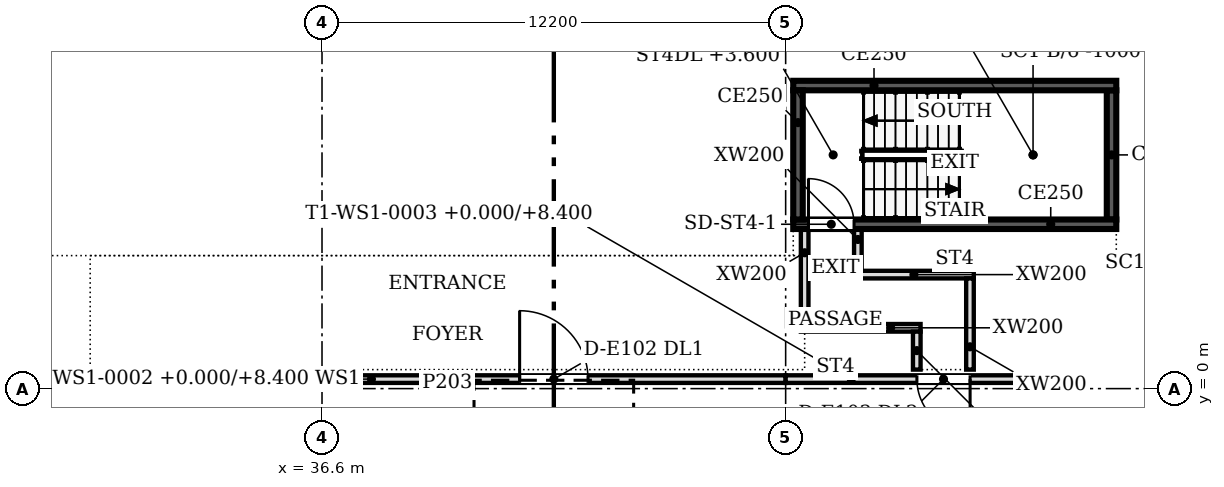
"""IFC4 building model, lengths in metres.
Left out: names, types, materials, properties, quantities, classifications, styles, units other than length and angle.
Written with IfcOpenShell. Run it as: python <this file> out.ifc"""

import sys

from ifc_helpers import new_model, si_unit, direction, frame, frame_2d, origin, place, context, subcontext, project, spatial, polyline, rectangle, outline, extrude, faceted_brep, source, transform, mapped, element, fill, save


model = new_model("IFC4")
c1 = context("Model", 3, precision=1e-05, world=origin(), true_north=direction((0.0, 1.0)))
c2 = subcontext(c1, "Body", "Model", "MODEL_VIEW")
j1 = project(units=[si_unit("LENGTHUNIT", "METRE"), si_unit("PLANEANGLEUNIT", "RADIAN")], contexts=[c1])
p1 = place(None, origin())
s1 = spatial("IfcSite", under=j1, at=p1, CompositionType="ELEMENT")
p2 = place(p1, origin())
s2 = spatial("IfcBuilding", under=s1, at=p2, CompositionType="ELEMENT")
p3 = place(p2, origin())
s3 = spatial("IfcBuildingStorey", under=s2, at=p3, CompositionType="ELEMENT", Elevation=0.0)
m1 = source(origin(), c2, "Body", "Brep", [
    faceted_brep([(0.0, -0.1, 0.0), (6.072, -0.1, 0.0), (0.019, -0.1, 8.4), (0.0, -0.1, 8.373), (0.037, 0.1, 8.374), (6.072, 0.1, 0.0), (0.037, 0.1, 0.0), (0.019, 0.0, 8.4)], [[[0, 1, 2, 3]], [[4, 5, 6]], [[6, 5, 1, 0]], [[5, 4, 7, 2, 1]], [[3, 2, 7]], [[6, 0, 3, 7, 4]]]),
])
p4 = place(p3, frame((30.528, 0.25, 0.0), z_axis=(0.0, 0.0, 1.0), x_axis=(1.0, 0.0, 0.0)))
e1 = element("IfcWall", 1, at=p4, inside=s3, PredefinedType="PARTITIONING", context=c2, shape_type="MappedRepresentation", body=[
    mapped(m1, transform((0.0, 0.0, 0.0), scale=1.0)),
])
m2 = source(origin(), c2, "Body", "SweptSolid", [
    extrude(outline(polyline([(0.219, 0.15), (5.779, 0.15), (0.219, 7.866), (0.219, 0.15)])), frame((0.0, 0.11, 0.0), z_axis=(0.0, -1.0, 0.0), x_axis=(1.0, 0.0, 0.0)), (0.0, 0.0, 1.0), 0.22),
])
p5 = place(p4, origin())
e2 = element("IfcOpeningElement", 2, at=p5, cuts=e1, PredefinedType="OPENING", context=c2, shape_type="MappedRepresentation", body=[
    mapped(m2, transform((0.0, 0.0, 0.0), scale=1.0)),
])
m3 = source(origin(), c2, "Body", "SweptSolid", [
    extrude(outline(polyline([(0.0, 0.0), (12.2, 0.0), (6.1, 8.4), (0.0, 0.0)])), frame((0.0, 0.1, 0.0), z_axis=(0.0, -1.0, 0.0), x_axis=(1.0, 0.0, 0.0)), (0.0, 0.0, 1.0), 0.2),
])
p6 = place(p3, frame((36.6, 0.25, 0.0), z_axis=(0.0, 0.0, 1.0), x_axis=(1.0, 0.0, 0.0)))
e3 = element("IfcWall", 3, at=p6, inside=s3, PredefinedType="PARTITIONING", context=c2, shape_type="MappedRepresentation", body=[
    mapped(m3, transform((0.0, 0.0, 0.0), scale=1.0)),
])
m4 = source(origin(), c2, "Body", "SweptSolid", [
    extrude(rectangle(XDim=1.8, YDim=3.0, at=frame_2d((0.9, 1.5))), frame((0.0, 0.11, 0.0), z_axis=(0.0, -1.0, 0.0), x_axis=(1.0, 0.0, 0.0)), (0.0, 0.0, 1.0), 0.22),
])
p7 = place(p6, frame((5.2, 0.0, 0.0)))
e4 = element("IfcOpeningElement", 4, at=p7, cuts=e3, PredefinedType="OPENING", context=c2, shape_type="MappedRepresentation", body=[
    mapped(m4, transform((0.0, 0.0, 0.0), scale=1.0)),
])
m5 = source(origin(), c2, "Body", "SweptSolid", [
    extrude(outline(polyline([(9.749, 3.12), (6.1, 8.145), (2.451, 3.12), (9.749, 3.12)])), frame((0.0, 0.11, 0.0), z_axis=(0.0, -1.0, 0.0), x_axis=(1.0, 0.0, 0.0)), (0.0, 0.0, 1.0), 0.22),
])
p8 = place(p6, origin())
e5 = element("IfcOpeningElement", 5, at=p8, cuts=e3, PredefinedType="OPENING", context=c2, shape_type="MappedRepresentation", body=[
    mapped(m5, transform((0.0, 0.0, 0.0), scale=1.0)),
])
m6 = source(origin(), c2, "Body", "SweptSolid", [
    extrude(outline(polyline([(0.294, 0.15), (5.08, 0.15), (5.08, 3.0), (2.364, 3.0), (0.294, 0.15)])), frame((0.0, 0.11, 0.0), z_axis=(0.0, -1.0, 0.0), x_axis=(1.0, 0.0, 0.0)), (0.0, 0.0, 1.0), 0.22),
])
p9 = place(p6, origin())
e6 = element("IfcOpeningElement", 6, at=p9, cuts=e3, PredefinedType="OPENING", context=c2, shape_type="MappedRepresentation", body=[
    mapped(m6, transform((0.0, 0.0, 0.0), scale=1.0)),
])
m7 = source(origin(), c2, "Body", "SweptSolid", [
    extrude(outline(polyline([(7.12, 0.15), (11.906, 0.15), (9.836, 3.0), (7.12, 3.0), (7.12, 0.15)])), frame((0.0, 0.11, 0.0), z_axis=(0.0, -1.0, 0.0), x_axis=(1.0, 0.0, 0.0)), (0.0, 0.0, 1.0), 0.22),
])
p10 = place(p6, origin())
e7 = element("IfcOpeningElement", 7, at=p10, cuts=e3, PredefinedType="OPENING", context=c2, shape_type="MappedRepresentation", body=[
    mapped(m7, transform((0.0, 0.0, 0.0), scale=1.0)),
])
m8 = source(origin(), c2, "Body", "Brep", [
    faceted_brep([(0.0, -0.1, 0.0), (6.072, -0.1, 0.0), (6.072, -0.1, 8.373), (6.053, -0.1, 8.4), (6.035, 0.1, 0.0), (0.0, 0.1, 0.0), (6.035, 0.1, 8.374), (6.053, 0.0, 8.4)], [[[0, 1, 2, 3]], [[4, 5, 6]], [[5, 4, 1, 0]], [[7, 3, 2]], [[6, 5, 0, 3, 7]], [[1, 4, 6, 7, 2]]]),
])
p11 = place(p3, frame((48.8, 0.25, 0.0), z_axis=(0.0, 0.0, 1.0), x_axis=(1.0, 0.0, 0.0)))
e8 = element("IfcWall", 8, at=p11, inside=s3, PredefinedType="PARTITIONING", context=c2, shape_type="MappedRepresentation", body=[
    mapped(m8, transform((0.0, 0.0, 0.0), scale=1.0)),
])
m9 = source(origin(), c2, "Body", "SweptSolid", [
    extrude(rectangle(XDim=1.4, YDim=2.4, at=frame_2d((0.7, 1.2))), frame((0.0, 0.11, 0.0), z_axis=(0.0, -1.0, 0.0), x_axis=(1.0, 0.0, 0.0)), (0.0, 0.0, 1.0), 0.22),
])
p12 = place(p11, frame((3.453, 0.0, 0.0)))
e9 = element("IfcOpeningElement", 9, at=p12, cuts=e8, PredefinedType="OPENING", context=c2, shape_type="MappedRepresentation", body=[
    mapped(m9, transform((0.0, 0.0, 0.0), scale=1.0)),
])
m10 = source(origin(), c2, "Body", "SweptSolid", [
    extrude(outline(polyline([(5.854, 7.866), (2.001, 2.52), (5.854, 2.52), (5.854, 7.866)])), frame((0.0, 0.11, 0.0), z_axis=(0.0, -1.0, 0.0), x_axis=(1.0, 0.0, 0.0)), (0.0, 0.0, 1.0), 0.22),
])
p13 = place(p11, origin())
e10 = element("IfcOpeningElement", 10, at=p13, cuts=e8, PredefinedType="OPENING", context=c2, shape_type="MappedRepresentation", body=[
    mapped(m10, transform((0.0, 0.0, 0.0), scale=1.0)),
])
m11 = source(origin(), c2, "Body", "SweptSolid", [
    extrude(outline(polyline([(0.293, 0.15), (3.333, 0.15), (3.333, 2.4), (1.915, 2.4), (0.293, 0.15)])), frame((0.0, 0.11, 0.0), z_axis=(0.0, -1.0, 0.0), x_axis=(1.0, 0.0, 0.0)), (0.0, 0.0, 1.0), 0.22),
])
p14 = place(p11, origin())
e11 = element("IfcOpeningElement", 11, at=p14, cuts=e8, PredefinedType="OPENING", context=c2, shape_type="MappedRepresentation", body=[
    mapped(m11, transform((0.0, 0.0, 0.0), scale=1.0)),
])
m12 = source(origin(), c2, "Body", "SweptSolid", [
    extrude(outline(polyline([(4.973, 0.15), (5.854, 0.15), (5.854, 2.4), (4.973, 2.4), (4.973, 0.15)])), frame((0.0, 0.11, 0.0), z_axis=(0.0, -1.0, 0.0), x_axis=(1.0, 0.0, 0.0)), (0.0, 0.0, 1.0), 0.22),
])
p15 = place(p11, origin())
e12 = element("IfcOpeningElement", 12, at=p15, cuts=e8, PredefinedType="OPENING", context=c2, shape_type="MappedRepresentation", body=[
    mapped(m12, transform((0.0, 0.0, 0.0), scale=1.0)),
])
m13 = source(origin(), c2, "Body", "Brep", [
    faceted_brep([(0.0, -0.25, 0.0), (6.1, -0.25, 8.4), (6.1, -0.25, 8.4), (5.482, -0.25, 8.4), (0.0, -0.25, 0.851), (0.0, 0.25, 0.851), (5.482, 0.25, 8.4), (6.1, 0.25, 8.4), (6.1, 0.25, 8.4), (0.0, 0.25, 0.0)], [[[0, 1, 2, 3, 4]], [[5, 6, 7, 8, 9]], [[9, 8, 1, 0]], [[7, 6, 3, 2]], [[6, 5, 4, 3]], [[5, 9, 0, 4]], [[1, 8, 7, 2]]]),
])
p16 = place(p3, frame((36.6, 0.25, 0.0), z_axis=(0.0, 0.0, 1.0), x_axis=(1.0, 0.0, 0.0)))
e13 = element("IfcWall", 13, at=p16, inside=s3, PredefinedType="SOLIDWALL", context=c2, shape_type="MappedRepresentation", body=[
    mapped(m13, transform((0.0, 0.0, 0.0), scale=1.0)),
])
m14 = source(origin(), c2, "Body", "Brep", [
    faceted_brep([(0.0, -0.25, 8.4), (6.053, -0.25, 0.0), (6.053, -0.25, 0.851), (0.613, -0.25, 8.4), (0.613, 0.25, 8.4), (6.053, 0.25, 0.851), (6.053, 0.25, 0.0), (0.047, 0.25, 8.335), (0.047, 0.25, 8.4), (0.0, 0.0, 8.4)], [[[0, 1, 2, 3]], [[4, 5, 6, 7, 8]], [[7, 6, 1, 0, 9]], [[5, 4, 3, 2]], [[4, 8, 9, 0, 3]], [[7, 9, 8]], [[1, 6, 5, 2]]]),
])
p17 = place(p3, frame((30.547, 0.25, 0.0), z_axis=(0.0, 0.0, 1.0), x_axis=(1.0, 0.0, 0.0)))
e14 = element("IfcWall", 14, at=p17, inside=s3, PredefinedType="SOLIDWALL", context=c2, shape_type="MappedRepresentation", body=[
    mapped(m14, transform((0.0, 0.0, 0.0), scale=1.0)),
])
m15 = source(origin(), c2, "Body", "Brep", [
    faceted_brep([(0.0, -0.25, 0.0), (6.053, -0.25, 8.4), (5.44, -0.25, 8.4), (0.0, -0.25, 0.851), (0.0, 0.25, 0.851), (5.44, 0.25, 8.4), (6.007, 0.25, 8.4), (6.007, 0.25, 8.335), (0.0, 0.25, 0.0), (6.053, 0.0, 8.4)], [[[0, 1, 2, 3]], [[4, 5, 6, 7, 8]], [[8, 7, 9, 1, 0]], [[6, 5, 2, 1, 9]], [[5, 4, 3, 2]], [[4, 8, 0, 3]], [[7, 6, 9]]]),
])
p18 = place(p3, frame((48.8, 0.25, 0.0), z_axis=(0.0, 0.0, 1.0), x_axis=(1.0, 0.0, 0.0)))
e15 = element("IfcWall", 15, at=p18, inside=s3, PredefinedType="SOLIDWALL", context=c2, shape_type="MappedRepresentation", body=[
    mapped(m15, transform((0.0, 0.0, 0.0), scale=1.0)),
])
m16 = source(origin(), c2, "Body", "SweptSolid", [
    extrude(outline(polyline([(0.0, 8.4), (6.1, 0.0), (6.1, 0.851), (0.618, 8.4), (0.0, 8.4)])), frame((0.0, 0.25, 0.0), z_axis=(0.0, -1.0, 0.0), x_axis=(1.0, 0.0, 0.0)), (0.0, 0.0, 1.0), 0.5),
])
p19 = place(p3, frame((42.7, 0.25, 0.0), z_axis=(0.0, 0.0, 1.0), x_axis=(1.0, 0.0, 0.0)))
e16 = element("IfcWall", 16, at=p19, inside=s3, PredefinedType="SOLIDWALL", context=c2, shape_type="MappedRepresentation", body=[
    mapped(m16, transform((0.0, 0.0, 0.0), scale=1.0)),
])
p20 = place(p2, frame((0.0, 0.0, 7.2)))
s4 = spatial("IfcBuildingStorey", under=s2, at=p20, CompositionType="ELEMENT", Elevation=7.2)
m17 = source(origin(), c2, "Body", "Brep", [
    faceted_brep([(0.0, -0.25, 0.0), (2.958, -0.25, 0.0), (2.958, -0.25, 16.8), (0.0, -0.25, 16.8), (0.047, 0.25, 16.8), (2.958, 0.25, 16.8), (2.958, 0.25, 0.0), (0.047, 0.25, 0.0), (0.0, 0.0, 0.0), (0.0, 0.0, 16.8)], [[[0, 1, 2, 3]], [[4, 5, 6, 7]], [[7, 6, 1, 0, 8]], [[5, 4, 9, 3, 2]], [[8, 0, 3, 9]], [[7, 8, 9, 4]], [[1, 6, 5, 2]]]),
])
p21 = place(p20, frame((54.854, 0.25, -7.2), z_axis=(0.0, 0.0, 1.0), x_axis=(0.932987802691, 0.359907988283, 0.0)))
e17 = element("IfcWall", 17, at=p21, inside=s4, PredefinedType="SOLIDWALL", context=c2, shape_type="MappedRepresentation", body=[
    mapped(m17, transform((0.0, 0.0, 0.0), scale=1.0)),
])
m18 = source(origin(), c2, "Body", "Brep", [
    faceted_brep([(0.0, -0.25, 0.0), (2.944, -0.25, 0.0), (2.944, -0.25, 16.8), (0.0, -0.25, 16.8), (0.053, 0.25, 16.8), (2.891, 0.25, 16.8), (2.891, 0.25, 0.0), (0.053, 0.25, 0.0), (2.944, 0.0, 0.0), (0.0, 0.0, 0.0), (2.944, 0.0, 16.8), (0.0, 0.0, 16.8)], [[[0, 1, 2, 3]], [[4, 5, 6, 7]], [[7, 6, 8, 1, 0, 9]], [[10, 2, 1, 8]], [[5, 4, 11, 3, 2, 10]], [[9, 0, 3, 11]], [[7, 9, 11, 4]], [[8, 6, 5, 10]]]),
])
p22 = place(p20, frame((57.606, 1.312, -7.2), z_axis=(0.0, 0.0, 1.0), x_axis=(0.707106781187, 0.707106781187, 0.0)))
e18 = element("IfcWall", 18, at=p22, inside=s4, PredefinedType="SOLIDWALL", context=c2, shape_type="MappedRepresentation", body=[
    mapped(m18, transform((0.0, 0.0, 0.0), scale=1.0)),
])
m19 = source(origin(), c2, "Body", "Brep", [
    faceted_brep([(0.0, -0.25, 0.0), (2.95, -0.25, 0.0), (2.95, -0.25, 16.8), (0.0, -0.25, 16.8), (0.053, 0.25, 16.8), (2.904, 0.25, 16.8), (2.904, 0.25, 0.0), (0.053, 0.25, 0.0), (2.95, 0.0, 0.0), (0.0, 0.0, 0.0), (2.95, 0.0, 16.8), (0.0, 0.0, 16.8)], [[[0, 1, 2, 3]], [[4, 5, 6, 7]], [[7, 6, 8, 1, 0, 9]], [[10, 2, 1, 8]], [[5, 4, 11, 3, 2, 10]], [[9, 0, 3, 11]], [[7, 9, 11, 4]], [[8, 6, 5, 10]]]),
])
p23 = place(p20, frame((27.794, 1.312, -7.2), z_axis=(0.0, 0.0, 1.0), x_axis=(0.932971887438, -0.359949242603, 0.0)))
e19 = element("IfcWall", 19, at=p23, inside=s4, PredefinedType="SOLIDWALL", context=c2, shape_type="MappedRepresentation", body=[
    mapped(m19, transform((0.0, 0.0, 0.0), scale=1.0)),
])
p24 = place(p3, frame((57.5, 4.325, 0.0), z_axis=(0.0, 0.0, 1.0), x_axis=(-1.0, 0.0, 0.0)))
e20 = element("IfcWall", 20, at=p24, inside=s3, PredefinedType="SOLIDWALL", context=c2, shape_type="SweptSolid", body=[
    extrude(rectangle(XDim=8.5, YDim=0.25, at=frame_2d((4.25, 0.0))), origin(), (0.0, 0.0, 1.0), 7.2),
])
m20 = source(origin(), c2, "Body", "SweptSolid", [
    extrude(rectangle(XDim=1.2, YDim=2.1, at=frame_2d((0.6, 1.05))), frame((0.0, 0.135, 0.0), z_axis=(0.0, -1.0, 0.0), x_axis=(1.0, 0.0, 0.0)), (0.0, 0.0, 1.0), 0.27),
])
p25 = place(p24, frame((6.9, 0.0, 0.0)))
e21 = element("IfcOpeningElement", 21, at=p25, cuts=e20, PredefinedType="OPENING", context=c2, shape_type="MappedRepresentation", body=[
    mapped(m20, transform((0.0, 0.0, 0.0), scale=1.0)),
])
p26 = place(p3, frame((49.125, 4.45, 0.0), z_axis=(0.0, 0.0, 1.0), x_axis=(0.0, 1.0, 0.0)))
e22 = element("IfcWall", 22, at=p26, inside=s3, PredefinedType="SOLIDWALL", context=c2, shape_type="SweptSolid", body=[
    extrude(rectangle(XDim=3.4, YDim=0.25, at=frame_2d((1.7, 0.0))), origin(), (0.0, 0.0, 1.0), 7.2),
])
p27 = place(p3, frame((49.0, 7.975, 0.0), z_axis=(0.0, 0.0, 1.0), x_axis=(1.0, 0.0, 0.0)))
e23 = element("IfcWall", 23, at=p27, inside=s3, PredefinedType="SOLIDWALL", context=c2, shape_type="SweptSolid", body=[
    extrude(rectangle(XDim=8.5, YDim=0.25, at=frame_2d((4.25, 0.0))), origin(), (0.0, 0.0, 1.0), 7.2),
])
p28 = place(p3, frame((57.375, 7.85, 0.0), z_axis=(0.0, 0.0, 1.0), x_axis=(0.0, -1.0, 0.0)))
e24 = element("IfcWall", 24, at=p28, inside=s3, PredefinedType="SOLIDWALL", context=c2, shape_type="SweptSolid", body=[
    extrude(rectangle(XDim=3.4, YDim=0.25, at=frame_2d((1.7, 0.0))), origin(), (0.0, 0.0, 1.0), 7.2),
])
p29 = place(p3, frame((49.3, 1.7, 0.0), z_axis=(0.0, 0.0, 1.0), x_axis=(0.0, 1.0, 0.0)))
e25 = element("IfcWall", 25, at=p29, inside=s3, PredefinedType="PARTITIONING", context=c2, shape_type="SweptSolid", body=[
    extrude(rectangle(XDim=2.5, YDim=0.2, at=frame_2d((1.25, 0.0))), origin(), (0.0, 0.0, 1.0), 6.115),
])
p30 = place(p3, frame((49.2, 1.6, 0.0), z_axis=(0.0, 0.0, 1.0), x_axis=(1.0, 0.0, 0.0)))
e26 = element("IfcWall", 26, at=p30, inside=s3, PredefinedType="PARTITIONING", context=c2, shape_type="SweptSolid", body=[
    extrude(rectangle(XDim=3.15, YDim=0.2, at=frame_2d((1.575, 0.0))), origin(), (0.0, 0.0, 1.0), 6.115),
])
p31 = place(p3, frame((50.7, 3.1, 0.0), z_axis=(0.0, 0.0, 1.0), x_axis=(0.0, 1.0, 0.0)))
e27 = element("IfcWall", 27, at=p31, inside=s3, PredefinedType="PARTITIONING", context=c2, shape_type="SweptSolid", body=[
    extrude(rectangle(XDim=1.1, YDim=0.2, at=frame_2d((0.55, 0.0))), origin(), (0.0, 0.0, 1.0), 6.115),
])
p32 = place(p3, frame((50.6, 3.0, 0.0), z_axis=(0.0, 0.0, 1.0), x_axis=(1.0, 0.0, 0.0)))
e28 = element("IfcWall", 28, at=p32, inside=s3, PredefinedType="PARTITIONING", context=c2, shape_type="SweptSolid", body=[
    extrude(rectangle(XDim=3.15, YDim=0.2, at=frame_2d((1.575, 0.0))), origin(), (0.0, 0.0, 1.0), 6.115),
])
p33 = place(p3, frame((52.25, 0.5, 0.0), z_axis=(0.0, 0.0, 1.0), x_axis=(0.0, 1.0, 0.0)))
e29 = element("IfcWall", 29, at=p33, inside=s3, PredefinedType="PARTITIONING", context=c2, shape_type="SweptSolid", body=[
    extrude(rectangle(XDim=1.0, YDim=0.2, at=frame_2d((0.5, 0.0))), origin(), (0.0, 0.0, 1.0), 6.115),
])
p34 = place(p3, frame((53.65, 0.5, 0.0), z_axis=(0.0, 0.0, 1.0), x_axis=(0.0, 1.0, 0.0)))
e30 = element("IfcWall", 30, at=p34, inside=s3, PredefinedType="PARTITIONING", context=c2, shape_type="SweptSolid", body=[
    extrude(rectangle(XDim=2.4, YDim=0.2, at=frame_2d((1.2, 0.0))), origin(), (0.0, 0.0, 1.0), 6.115),
])
m21 = source(origin(), c2, "Body", "SweptSolid", [
    extrude(rectangle(XDim=1.8, YDim=3.0, at=frame_2d((0.9, 1.5))), frame((0.0, 0.025, 0.0), z_axis=(0.0, -1.0, 0.0), x_axis=(1.0, 0.0, 0.0)), (0.0, 0.0, 1.0), 0.05),
])
p35 = place(p7, origin())
e31 = element("IfcDoor", 31, at=p35, inside=s3, OperationType="DOUBLE_DOOR_SINGLE_SWING", PredefinedType="DOOR", context=c2, shape_type="MappedRepresentation", body=[
    mapped(m21, transform((0.0, 0.0, 0.0), scale=1.0)),
])
fill(e4, e31)
m22 = source(origin(), c2, "Body", "SweptSolid", [
    extrude(rectangle(XDim=1.4, YDim=2.4, at=frame_2d((0.7, 1.2))), frame((0.0, 0.025, 0.0), z_axis=(0.0, -1.0, 0.0), x_axis=(1.0, 0.0, 0.0)), (0.0, 0.0, 1.0), 0.05),
])
p36 = place(p12, frame((1.4, 0.0, 0.0), x_axis=(-1.0, 0.0, 0.0)))
e32 = element("IfcDoor", 32, at=p36, inside=s3, OperationType="SINGLE_SWING_LEFT", PredefinedType="DOOR", context=c2, shape_type="MappedRepresentation", body=[
    mapped(m22, transform((0.0, 0.0, 0.0), scale=1.0)),
])
fill(e9, e32)
m23 = source(origin(), c2, "Body", "SweptSolid", [
    extrude(rectangle(XDim=1.2, YDim=2.1, at=frame_2d((0.6, 1.05))), frame((0.0, 0.025, 0.0), z_axis=(0.0, -1.0, 0.0), x_axis=(1.0, 0.0, 0.0)), (0.0, 0.0, 1.0), 0.05),
])
p37 = place(p25, origin())
e33 = element("IfcDoor", 33, at=p37, inside=s3, OperationType="SINGLE_SWING_RIGHT", PredefinedType="DOOR", context=c2, shape_type="MappedRepresentation", body=[
    mapped(m23, transform((0.0, 0.0, 0.0), scale=1.0)),
])
fill(e21, e33)
save(model, sys.argv[1])
